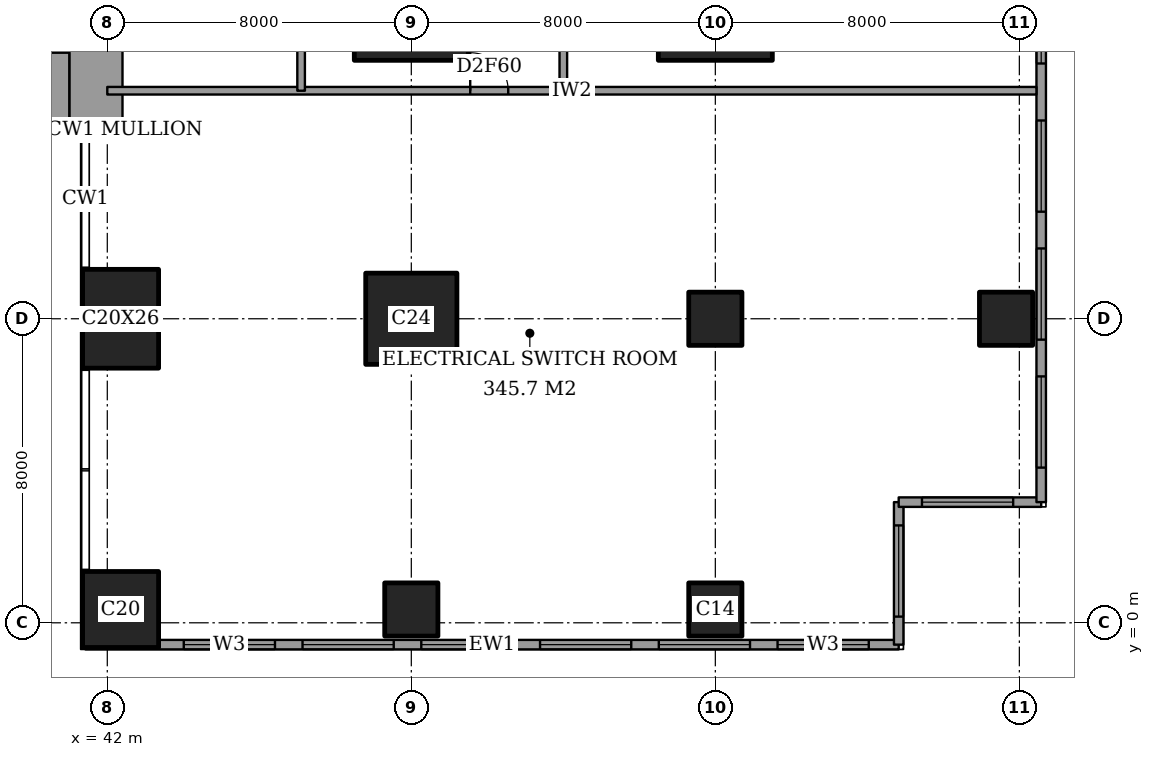
"""IFC4 building model, lengths in metres.
Left out: names, types, materials, properties, quantities, classifications, styles, units other than length and angle.
Written with IfcOpenShell. Run it as: python <this file> out.ifc"""

import sys

from ifc_helpers import new_model, si_unit, direction, frame, frame_2d, origin, origin_2d, place, context, subcontext, project, spatial, rectangle, extrude, element, fill, save


model = new_model("IFC4")
c1 = context("Model", 3, precision=1e-05, world=origin(), true_north=direction((0.0, 1.0)))
c2 = subcontext(c1, "Body", "Model", "MODEL_VIEW")
j1 = project(units=[si_unit("LENGTHUNIT", "METRE"), si_unit("PLANEANGLEUNIT", "RADIAN")], contexts=[c1])
p1 = place(None, origin())
s1 = spatial("IfcSite", under=j1, at=p1, CompositionType="ELEMENT")
p2 = place(p1, origin())
s2 = spatial("IfcBuilding", under=s1, at=p2, CompositionType="ELEMENT")
p3 = place(p2, frame((0.0, 0.0, 296.6)))
s3 = spatial("IfcBuildingStorey", under=s2, at=p3, CompositionType="ELEMENT", Elevation=296.6)
p4 = place(p3, frame((42.35, 0.35, 0.0), z_axis=(0.0, 0.0, 1.0), x_axis=(1.0, 0.0, 0.0)))
e1 = element("IfcColumn", 1, at=p4, inside=s3, PredefinedType="COLUMN", context=c2, shape_type="SweptSolid", body=[
    extrude(rectangle(XDim=2.0, YDim=2.0, at=origin_2d()), origin(), (0.0, 0.0, 1.0), 5.0),
])
p5 = place(p3, frame((42.35, 8.0, 0.0), z_axis=(0.0, 0.0, 1.0), x_axis=(1.0, 0.0, 0.0)))
e2 = element("IfcColumn", 2, at=p5, inside=s3, PredefinedType="COLUMN", context=c2, shape_type="SweptSolid", body=[
    extrude(rectangle(XDim=2.0, YDim=2.6, at=origin_2d()), origin(), (0.0, 0.0, 1.0), 5.0),
])
p6 = place(p3, frame((50.0, 0.35, 0.0), z_axis=(0.0, 0.0, 1.0), x_axis=(1.0, 0.0, 0.0)))
e3 = element("IfcColumn", 3, at=p6, inside=s3, PredefinedType="COLUMN", context=c2, shape_type="SweptSolid", body=[
    extrude(rectangle(XDim=1.4, YDim=1.4, at=origin_2d()), origin(), (0.0, 0.0, 1.0), 5.0),
])
p7 = place(p3, frame((50.0, 8.0, 0.0), z_axis=(0.0, 0.0, 1.0), x_axis=(1.0, 0.0, 0.0)))
e4 = element("IfcColumn", 4, at=p7, inside=s3, PredefinedType="COLUMN", context=c2, shape_type="SweptSolid", body=[
    extrude(rectangle(XDim=2.4, YDim=2.4, at=origin_2d()), origin(), (0.0, 0.0, 1.0), 5.0),
])
p8 = place(p3, frame((50.0, 16.0, 0.0), z_axis=(0.0, 0.0, 1.0), x_axis=(1.0, 0.0, 0.0)))
e5 = element("IfcColumn", 5, at=p8, inside=s3, PredefinedType="COLUMN", context=c2, shape_type="SweptSolid", body=[
    extrude(rectangle(XDim=3.0, YDim=2.4, at=origin_2d()), origin(), (0.0, 0.0, 1.0), 5.0),
])
for number, where, z_axis, x_axis in (
    (6, (58.0, 0.35, 0.0), (0.0, 0.0, 1.0), (1.0, 0.0, 0.0)),
    (7, (58.0, 8.0, 0.0), (0.0, 0.0, 1.0), (1.0, 0.0, 0.0)),
):
    element("IfcColumn", number, at=place(p3, frame(where, z_axis=z_axis, x_axis=x_axis)), inside=s3, PredefinedType="COLUMN", context=c2, shape_type="SweptSolid", body=[
        extrude(rectangle(XDim=1.4, YDim=1.4, at=origin_2d()), origin(), (0.0, 0.0, 1.0), 5.0),
    ])
p9 = place(p3, frame((58.0, 16.0, 0.0), z_axis=(0.0, 0.0, 1.0), x_axis=(1.0, 0.0, 0.0)))
e8 = element("IfcColumn", 8, at=p9, inside=s3, PredefinedType="COLUMN", context=c2, shape_type="SweptSolid", body=[
    extrude(rectangle(XDim=3.0, YDim=2.4, at=origin_2d()), origin(), (0.0, 0.0, 1.0), 5.0),
])
p10 = place(p3, frame((65.65, 8.0, 0.0), z_axis=(0.0, 0.0, 1.0), x_axis=(1.0, 0.0, 0.0)))
e9 = element("IfcColumn", 9, at=p10, inside=s3, PredefinedType="COLUMN", context=c2, shape_type="SweptSolid", body=[
    extrude(rectangle(XDim=1.4, YDim=1.4, at=origin_2d()), origin(), (0.0, 0.0, 1.0), 5.0),
])
p11 = place(p3, frame((37.85, 14.0, 0.0), z_axis=(0.0, 0.0, 1.0), x_axis=(1.0, 0.0, 0.0)))
e10 = element("IfcWall", 10, at=p11, inside=s3, PredefinedType="SHEAR", context=c2, shape_type="SweptSolid", body=[
    extrude(rectangle(XDim=3.15, YDim=2.0, at=frame_2d((1.575, 0.0))), origin(), (0.0, 0.0, 1.0), 5.0),
])
p12 = place(p3, frame((41.7, 13.0, 0.0), z_axis=(0.0, 0.0, 1.0), x_axis=(0.0, 1.0, 0.0)))
e11 = element("IfcWall", 11, at=p12, inside=s3, PredefinedType="SHEAR", context=c2, shape_type="SweptSolid", body=[
    extrude(rectangle(XDim=11.85, YDim=1.4, at=frame_2d((5.925, 0.0))), origin(), (0.0, 0.0, 1.0), 5.0),
])
p13 = place(p12, frame((7.5, 0.0, 0.0)))
e12 = element("IfcOpeningElement", 12, at=p13, cuts=e11, PredefinedType="OPENING", context=c2, shape_type="SweptSolid", body=[
    extrude(rectangle(XDim=1.8, YDim=2.4, at=frame_2d((0.9, 1.2))), frame((0.0, 0.71, 0.0), z_axis=(0.0, -1.0, 0.0), x_axis=(1.0, 0.0, 0.0)), (0.0, 0.0, 1.0), 1.42),
])
p14 = place(p3, frame((41.425, -0.575, 0.0), z_axis=(0.0, 0.0, 1.0), x_axis=(1.0, 0.0, 0.0)))
e13 = element("IfcWall", 13, at=p14, inside=s3, PredefinedType="SOLIDWALL", context=c2, shape_type="SweptSolid", body=[
    extrude(rectangle(XDim=21.4, YDim=0.25, at=frame_2d((10.7, 0.0))), origin(), (0.0, 0.0, 1.0), 5.0),
])
p15 = place(p14, frame((2.587, 0.0, 0.6)))
e14 = element("IfcOpeningElement", 14, at=p15, cuts=e13, PredefinedType="OPENING", context=c2, shape_type="SweptSolid", body=[
    extrude(rectangle(XDim=2.4, YDim=3.0, at=frame_2d((1.2, 1.5))), frame((0.0, 0.135, 0.0), z_axis=(0.0, -1.0, 0.0), x_axis=(1.0, 0.0, 0.0)), (0.0, 0.0, 1.0), 0.27),
])
p16 = place(p14, frame((5.712, 0.0, 0.6)))
e15 = element("IfcOpeningElement", 15, at=p16, cuts=e13, PredefinedType="OPENING", context=c2, shape_type="SweptSolid", body=[
    extrude(rectangle(XDim=2.4, YDim=3.0, at=frame_2d((1.2, 1.5))), frame((0.0, 0.135, 0.0), z_axis=(0.0, -1.0, 0.0), x_axis=(1.0, 0.0, 0.0)), (0.0, 0.0, 1.0), 0.27),
])
p17 = place(p14, frame((8.837, 0.0, 0.6)))
e16 = element("IfcOpeningElement", 16, at=p17, cuts=e13, PredefinedType="OPENING", context=c2, shape_type="SweptSolid", body=[
    extrude(rectangle(XDim=2.4, YDim=3.0, at=frame_2d((1.2, 1.5))), frame((0.0, 0.135, 0.0), z_axis=(0.0, -1.0, 0.0), x_axis=(1.0, 0.0, 0.0)), (0.0, 0.0, 1.0), 0.27),
])
p18 = place(p14, frame((11.962, 0.0, 0.6)))
e17 = element("IfcOpeningElement", 17, at=p18, cuts=e13, PredefinedType="OPENING", context=c2, shape_type="SweptSolid", body=[
    extrude(rectangle(XDim=2.4, YDim=3.0, at=frame_2d((1.2, 1.5))), frame((0.0, 0.135, 0.0), z_axis=(0.0, -1.0, 0.0), x_axis=(1.0, 0.0, 0.0)), (0.0, 0.0, 1.0), 0.27),
])
p19 = place(p14, frame((15.087, 0.0, 0.6)))
e18 = element("IfcOpeningElement", 18, at=p19, cuts=e13, PredefinedType="OPENING", context=c2, shape_type="SweptSolid", body=[
    extrude(rectangle(XDim=2.4, YDim=3.0, at=frame_2d((1.2, 1.5))), frame((0.0, 0.135, 0.0), z_axis=(0.0, -1.0, 0.0), x_axis=(1.0, 0.0, 0.0)), (0.0, 0.0, 1.0), 0.27),
])
p20 = place(p14, frame((18.212, 0.0, 0.6)))
e19 = element("IfcOpeningElement", 19, at=p20, cuts=e13, PredefinedType="OPENING", context=c2, shape_type="SweptSolid", body=[
    extrude(rectangle(XDim=2.4, YDim=3.0, at=frame_2d((1.2, 1.5))), frame((0.0, 0.135, 0.0), z_axis=(0.0, -1.0, 0.0), x_axis=(1.0, 0.0, 0.0)), (0.0, 0.0, 1.0), 0.27),
])
p21 = place(p3, frame((62.825, -0.575, 0.0), z_axis=(0.0, 0.0, 1.0), x_axis=(0.0, 1.0, 0.0)))
e20 = element("IfcWall", 20, at=p21, inside=s3, PredefinedType="SOLIDWALL", context=c2, shape_type="SweptSolid", body=[
    extrude(rectangle(XDim=3.75, YDim=0.25, at=frame_2d((1.875, 0.0))), origin(), (0.0, 0.0, 1.0), 5.0),
])
p22 = place(p21, frame((0.738, 0.0, 0.6)))
e21 = element("IfcOpeningElement", 21, at=p22, cuts=e20, PredefinedType="OPENING", context=c2, shape_type="SweptSolid", body=[
    extrude(rectangle(XDim=2.4, YDim=3.0, at=frame_2d((1.2, 1.5))), frame((0.0, 0.135, 0.0), z_axis=(0.0, -1.0, 0.0), x_axis=(1.0, 0.0, 0.0)), (0.0, 0.0, 1.0), 0.27),
])
p23 = place(p3, frame((62.825, 3.175, 0.0), z_axis=(0.0, 0.0, 1.0), x_axis=(1.0, 0.0, 0.0)))
e22 = element("IfcWall", 22, at=p23, inside=s3, PredefinedType="SOLIDWALL", context=c2, shape_type="SweptSolid", body=[
    extrude(rectangle(XDim=3.75, YDim=0.25, at=frame_2d((1.875, 0.0))), origin(), (0.0, 0.0, 1.0), 5.0),
])
p24 = place(p23, frame((0.613, 0.0, 0.6)))
e23 = element("IfcOpeningElement", 23, at=p24, cuts=e22, PredefinedType="OPENING", context=c2, shape_type="SweptSolid", body=[
    extrude(rectangle(XDim=2.4, YDim=3.0, at=frame_2d((1.2, 1.5))), frame((0.0, 0.135, 0.0), z_axis=(0.0, -1.0, 0.0), x_axis=(1.0, 0.0, 0.0)), (0.0, 0.0, 1.0), 0.27),
])
p25 = place(p3, frame((66.575, 3.175, 0.0), z_axis=(0.0, 0.0, 1.0), x_axis=(0.0, 1.0, 0.0)))
e24 = element("IfcWall", 24, at=p25, inside=s3, PredefinedType="SOLIDWALL", context=c2, shape_type="SweptSolid", body=[
    extrude(rectangle(XDim=41.65, YDim=0.25, at=frame_2d((20.825, 0.0))), origin(), (0.0, 0.0, 1.0), 5.0),
])
p26 = place(p25, frame((0.908, 0.0, 0.6)))
e25 = element("IfcOpeningElement", 25, at=p26, cuts=e24, PredefinedType="OPENING", context=c2, shape_type="SweptSolid", body=[
    extrude(rectangle(XDim=2.4, YDim=3.0, at=frame_2d((1.2, 1.5))), frame((0.0, 0.135, 0.0), z_axis=(0.0, -1.0, 0.0), x_axis=(1.0, 0.0, 0.0)), (0.0, 0.0, 1.0), 0.27),
])
p27 = place(p25, frame((4.275, 0.0, 0.6)))
e26 = element("IfcOpeningElement", 26, at=p27, cuts=e24, PredefinedType="OPENING", context=c2, shape_type="SweptSolid", body=[
    extrude(rectangle(XDim=2.4, YDim=3.0, at=frame_2d((1.2, 1.5))), frame((0.0, 0.135, 0.0), z_axis=(0.0, -1.0, 0.0), x_axis=(1.0, 0.0, 0.0)), (0.0, 0.0, 1.0), 0.27),
])
p28 = place(p25, frame((7.642, 0.0, 0.6)))
e27 = element("IfcOpeningElement", 27, at=p28, cuts=e24, PredefinedType="OPENING", context=c2, shape_type="SweptSolid", body=[
    extrude(rectangle(XDim=2.4, YDim=3.0, at=frame_2d((1.2, 1.5))), frame((0.0, 0.135, 0.0), z_axis=(0.0, -1.0, 0.0), x_axis=(1.0, 0.0, 0.0)), (0.0, 0.0, 1.0), 0.27),
])
p29 = place(p25, frame((11.542, 0.0, 0.6)))
e28 = element("IfcOpeningElement", 28, at=p29, cuts=e24, PredefinedType="OPENING", context=c2, shape_type="SweptSolid", body=[
    extrude(rectangle(XDim=2.4, YDim=3.0, at=frame_2d((1.2, 1.5))), frame((0.0, 0.135, 0.0), z_axis=(0.0, -1.0, 0.0), x_axis=(1.0, 0.0, 0.0)), (0.0, 0.0, 1.0), 0.27),
])
p30 = place(p25, frame((14.775, 0.0, 0.6)))
e29 = element("IfcOpeningElement", 29, at=p30, cuts=e24, PredefinedType="OPENING", context=c2, shape_type="SweptSolid", body=[
    extrude(rectangle(XDim=2.4, YDim=3.0, at=frame_2d((1.2, 1.5))), frame((0.0, 0.135, 0.0), z_axis=(0.0, -1.0, 0.0), x_axis=(1.0, 0.0, 0.0)), (0.0, 0.0, 1.0), 0.27),
])
p31 = place(p25, frame((18.008, 0.0, 0.6)))
e30 = element("IfcOpeningElement", 30, at=p31, cuts=e24, PredefinedType="OPENING", context=c2, shape_type="SweptSolid", body=[
    extrude(rectangle(XDim=2.4, YDim=3.0, at=frame_2d((1.2, 1.5))), frame((0.0, 0.135, 0.0), z_axis=(0.0, -1.0, 0.0), x_axis=(1.0, 0.0, 0.0)), (0.0, 0.0, 1.0), 0.27),
])
p32 = place(p25, frame((21.242, 0.0, 0.6)))
e31 = element("IfcOpeningElement", 31, at=p32, cuts=e24, PredefinedType="OPENING", context=c2, shape_type="SweptSolid", body=[
    extrude(rectangle(XDim=2.4, YDim=3.0, at=frame_2d((1.2, 1.5))), frame((0.0, 0.135, 0.0), z_axis=(0.0, -1.0, 0.0), x_axis=(1.0, 0.0, 0.0)), (0.0, 0.0, 1.0), 0.27),
])
p33 = place(p25, frame((24.475, 0.0, 0.6)))
e32 = element("IfcOpeningElement", 32, at=p33, cuts=e24, PredefinedType="OPENING", context=c2, shape_type="SweptSolid", body=[
    extrude(rectangle(XDim=2.4, YDim=3.0, at=frame_2d((1.2, 1.5))), frame((0.0, 0.135, 0.0), z_axis=(0.0, -1.0, 0.0), x_axis=(1.0, 0.0, 0.0)), (0.0, 0.0, 1.0), 0.27),
])
p34 = place(p25, frame((27.708, 0.0, 0.6)))
e33 = element("IfcOpeningElement", 33, at=p34, cuts=e24, PredefinedType="OPENING", context=c2, shape_type="SweptSolid", body=[
    extrude(rectangle(XDim=2.4, YDim=3.0, at=frame_2d((1.2, 1.5))), frame((0.0, 0.135, 0.0), z_axis=(0.0, -1.0, 0.0), x_axis=(1.0, 0.0, 0.0)), (0.0, 0.0, 1.0), 0.27),
])
p35 = place(p25, frame((31.608, 0.0, 0.6)))
e34 = element("IfcOpeningElement", 34, at=p35, cuts=e24, PredefinedType="OPENING", context=c2, shape_type="SweptSolid", body=[
    extrude(rectangle(XDim=2.4, YDim=3.0, at=frame_2d((1.2, 1.5))), frame((0.0, 0.135, 0.0), z_axis=(0.0, -1.0, 0.0), x_axis=(1.0, 0.0, 0.0)), (0.0, 0.0, 1.0), 0.27),
])
p36 = place(p25, frame((34.975, 0.0, 0.6)))
e35 = element("IfcOpeningElement", 35, at=p36, cuts=e24, PredefinedType="OPENING", context=c2, shape_type="SweptSolid", body=[
    extrude(rectangle(XDim=2.4, YDim=3.0, at=frame_2d((1.2, 1.5))), frame((0.0, 0.135, 0.0), z_axis=(0.0, -1.0, 0.0), x_axis=(1.0, 0.0, 0.0)), (0.0, 0.0, 1.0), 0.27),
])
p37 = place(p25, frame((38.342, 0.0, 0.6)))
e36 = element("IfcOpeningElement", 36, at=p37, cuts=e24, PredefinedType="OPENING", context=c2, shape_type="SweptSolid", body=[
    extrude(rectangle(XDim=2.4, YDim=3.0, at=frame_2d((1.2, 1.5))), frame((0.0, 0.135, 0.0), z_axis=(0.0, -1.0, 0.0), x_axis=(1.0, 0.0, 0.0)), (0.0, 0.0, 1.0), 0.27),
])
p38 = place(p3, frame((42.0, 14.0, 0.0), z_axis=(0.0, 0.0, 1.0), x_axis=(1.0, 0.0, 0.0)))
e37 = element("IfcWall", 37, at=p38, inside=s3, PredefinedType="PARTITIONING", context=c2, shape_type="SweptSolid", body=[
    extrude(rectangle(XDim=24.45, YDim=0.2, at=frame_2d((12.225, 0.0))), origin(), (0.0, 0.0, 1.0), 4.7),
])
p39 = place(p38, frame((9.55, 0.0, 0.0)))
e38 = element("IfcOpeningElement", 38, at=p39, cuts=e37, PredefinedType="OPENING", context=c2, shape_type="SweptSolid", body=[
    extrude(rectangle(XDim=1.0, YDim=2.1, at=frame_2d((0.5, 1.05))), frame((0.0, 0.11, 0.0), z_axis=(0.0, -1.0, 0.0), x_axis=(1.0, 0.0, 0.0)), (0.0, 0.0, 1.0), 0.22),
])
p40 = place(p3, frame((47.1, 14.0, 0.0), z_axis=(0.0, 0.0, 1.0), x_axis=(0.0, 1.0, 0.0)))
e39 = element("IfcWall", 39, at=p40, inside=s3, PredefinedType="PARTITIONING", context=c2, shape_type="SweptSolid", body=[
    extrude(rectangle(XDim=6.0, YDim=0.2, at=frame_2d((3.0, 0.0))), origin(), (0.0, 0.0, 1.0), 4.7),
])
p41 = place(p40, frame((1.25, 0.0, 0.0)))
e40 = element("IfcOpeningElement", 40, at=p41, cuts=e39, PredefinedType="OPENING", context=c2, shape_type="SweptSolid", body=[
    extrude(rectangle(XDim=1.0, YDim=2.1, at=frame_2d((0.5, 1.05))), frame((0.0, 0.11, 0.0), z_axis=(0.0, -1.0, 0.0), x_axis=(1.0, 0.0, 0.0)), (0.0, 0.0, 1.0), 0.22),
])
p42 = place(p40, frame((4.25, 0.0, 0.0)))
e41 = element("IfcOpeningElement", 41, at=p42, cuts=e39, PredefinedType="OPENING", context=c2, shape_type="SweptSolid", body=[
    extrude(rectangle(XDim=1.0, YDim=2.1, at=frame_2d((0.5, 1.05))), frame((0.0, 0.11, 0.0), z_axis=(0.0, -1.0, 0.0), x_axis=(1.0, 0.0, 0.0)), (0.0, 0.0, 1.0), 0.22),
])
p43 = place(p3, frame((54.0, 14.0, 0.0), z_axis=(0.0, 0.0, 1.0), x_axis=(0.0, 1.0, 0.0)))
e42 = element("IfcWall", 42, at=p43, inside=s3, PredefinedType="PARTITIONING", context=c2, shape_type="SweptSolid", body=[
    extrude(rectangle(XDim=20.0, YDim=0.2, at=frame_2d((10.0, 0.0))), origin(), (0.0, 0.0, 1.0), 4.7),
])
p44 = place(p43, frame((9.5, 0.0, 0.0)))
e43 = element("IfcOpeningElement", 43, at=p44, cuts=e42, PredefinedType="OPENING", context=c2, shape_type="SweptSolid", body=[
    extrude(rectangle(XDim=1.0, YDim=2.1, at=frame_2d((0.5, 1.05))), frame((0.0, 0.11, 0.0), z_axis=(0.0, -1.0, 0.0), x_axis=(1.0, 0.0, 0.0)), (0.0, 0.0, 1.0), 0.22),
])
p45 = place(p15, origin())
e44 = element("IfcWindow", 44, at=p45, inside=s3, PartitioningType="SINGLE_PANEL", PredefinedType="WINDOW", context=c2, shape_type="SweptSolid", body=[
    extrude(rectangle(XDim=2.4, YDim=3.0, at=frame_2d((1.2, 1.5))), frame((0.0, 0.03, 0.0), z_axis=(0.0, -1.0, 0.0), x_axis=(1.0, 0.0, 0.0)), (0.0, 0.0, 1.0), 0.06),
])
fill(e14, e44)
p46 = place(p16, origin())
e45 = element("IfcWindow", 45, at=p46, inside=s3, PartitioningType="SINGLE_PANEL", PredefinedType="WINDOW", context=c2, shape_type="SweptSolid", body=[
    extrude(rectangle(XDim=2.4, YDim=3.0, at=frame_2d((1.2, 1.5))), frame((0.0, 0.03, 0.0), z_axis=(0.0, -1.0, 0.0), x_axis=(1.0, 0.0, 0.0)), (0.0, 0.0, 1.0), 0.06),
])
fill(e15, e45)
p47 = place(p17, origin())
e46 = element("IfcWindow", 46, at=p47, inside=s3, PartitioningType="SINGLE_PANEL", PredefinedType="WINDOW", context=c2, shape_type="SweptSolid", body=[
    extrude(rectangle(XDim=2.4, YDim=3.0, at=frame_2d((1.2, 1.5))), frame((0.0, 0.03, 0.0), z_axis=(0.0, -1.0, 0.0), x_axis=(1.0, 0.0, 0.0)), (0.0, 0.0, 1.0), 0.06),
])
fill(e16, e46)
p48 = place(p18, origin())
e47 = element("IfcWindow", 47, at=p48, inside=s3, PartitioningType="SINGLE_PANEL", PredefinedType="WINDOW", context=c2, shape_type="SweptSolid", body=[
    extrude(rectangle(XDim=2.4, YDim=3.0, at=frame_2d((1.2, 1.5))), frame((0.0, 0.03, 0.0), z_axis=(0.0, -1.0, 0.0), x_axis=(1.0, 0.0, 0.0)), (0.0, 0.0, 1.0), 0.06),
])
fill(e17, e47)
p49 = place(p19, origin())
e48 = element("IfcWindow", 48, at=p49, inside=s3, PartitioningType="SINGLE_PANEL", PredefinedType="WINDOW", context=c2, shape_type="SweptSolid", body=[
    extrude(rectangle(XDim=2.4, YDim=3.0, at=frame_2d((1.2, 1.5))), frame((0.0, 0.03, 0.0), z_axis=(0.0, -1.0, 0.0), x_axis=(1.0, 0.0, 0.0)), (0.0, 0.0, 1.0), 0.06),
])
fill(e18, e48)
p50 = place(p20, origin())
e49 = element("IfcWindow", 49, at=p50, inside=s3, PartitioningType="SINGLE_PANEL", PredefinedType="WINDOW", context=c2, shape_type="SweptSolid", body=[
    extrude(rectangle(XDim=2.4, YDim=3.0, at=frame_2d((1.2, 1.5))), frame((0.0, 0.03, 0.0), z_axis=(0.0, -1.0, 0.0), x_axis=(1.0, 0.0, 0.0)), (0.0, 0.0, 1.0), 0.06),
])
fill(e19, e49)
p51 = place(p22, origin())
e50 = element("IfcWindow", 50, at=p51, inside=s3, PartitioningType="SINGLE_PANEL", PredefinedType="WINDOW", context=c2, shape_type="SweptSolid", body=[
    extrude(rectangle(XDim=2.4, YDim=3.0, at=frame_2d((1.2, 1.5))), frame((0.0, 0.03, 0.0), z_axis=(0.0, -1.0, 0.0), x_axis=(1.0, 0.0, 0.0)), (0.0, 0.0, 1.0), 0.06),
])
fill(e21, e50)
p52 = place(p24, origin())
e51 = element("IfcWindow", 51, at=p52, inside=s3, PartitioningType="SINGLE_PANEL", PredefinedType="WINDOW", context=c2, shape_type="SweptSolid", body=[
    extrude(rectangle(XDim=2.4, YDim=3.0, at=frame_2d((1.2, 1.5))), frame((0.0, 0.03, 0.0), z_axis=(0.0, -1.0, 0.0), x_axis=(1.0, 0.0, 0.0)), (0.0, 0.0, 1.0), 0.06),
])
fill(e23, e51)
p53 = place(p26, origin())
e52 = element("IfcWindow", 52, at=p53, inside=s3, PartitioningType="SINGLE_PANEL", PredefinedType="WINDOW", context=c2, shape_type="SweptSolid", body=[
    extrude(rectangle(XDim=2.4, YDim=3.0, at=frame_2d((1.2, 1.5))), frame((0.0, 0.03, 0.0), z_axis=(0.0, -1.0, 0.0), x_axis=(1.0, 0.0, 0.0)), (0.0, 0.0, 1.0), 0.06),
])
fill(e25, e52)
p54 = place(p27, origin())
e53 = element("IfcWindow", 53, at=p54, inside=s3, PartitioningType="SINGLE_PANEL", PredefinedType="WINDOW", context=c2, shape_type="SweptSolid", body=[
    extrude(rectangle(XDim=2.4, YDim=3.0, at=frame_2d((1.2, 1.5))), frame((0.0, 0.03, 0.0), z_axis=(0.0, -1.0, 0.0), x_axis=(1.0, 0.0, 0.0)), (0.0, 0.0, 1.0), 0.06),
])
fill(e26, e53)
p55 = place(p28, origin())
e54 = element("IfcWindow", 54, at=p55, inside=s3, PartitioningType="SINGLE_PANEL", PredefinedType="WINDOW", context=c2, shape_type="SweptSolid", body=[
    extrude(rectangle(XDim=2.4, YDim=3.0, at=frame_2d((1.2, 1.5))), frame((0.0, 0.03, 0.0), z_axis=(0.0, -1.0, 0.0), x_axis=(1.0, 0.0, 0.0)), (0.0, 0.0, 1.0), 0.06),
])
fill(e27, e54)
p56 = place(p29, origin())
e55 = element("IfcWindow", 55, at=p56, inside=s3, PartitioningType="SINGLE_PANEL", PredefinedType="WINDOW", context=c2, shape_type="SweptSolid", body=[
    extrude(rectangle(XDim=2.4, YDim=3.0, at=frame_2d((1.2, 1.5))), frame((0.0, 0.03, 0.0), z_axis=(0.0, -1.0, 0.0), x_axis=(1.0, 0.0, 0.0)), (0.0, 0.0, 1.0), 0.06),
])
fill(e28, e55)
p57 = place(p39, origin())
e56 = element("IfcDoor", 56, at=p57, inside=s3, OperationType="SINGLE_SWING_RIGHT", PredefinedType="DOOR", context=c2, shape_type="SweptSolid", body=[
    extrude(rectangle(XDim=1.0, YDim=2.1, at=frame_2d((0.5, 1.05))), frame((0.0, 0.025, 0.0), z_axis=(0.0, -1.0, 0.0), x_axis=(1.0, 0.0, 0.0)), (0.0, 0.0, 1.0), 0.05),
])
fill(e38, e56)
save(model, sys.argv[1])
